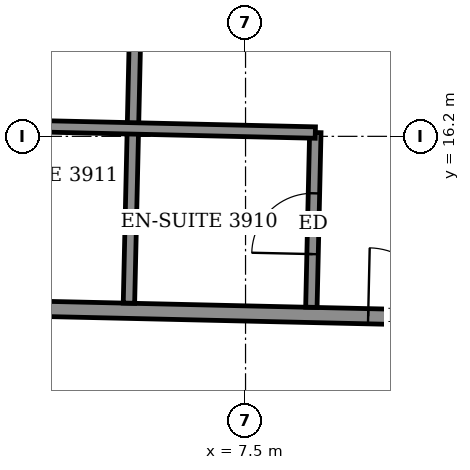
"""IFC4 building model, lengths in metres.
Left out: names, types, materials, properties, quantities, classifications, styles, units other than length and angle.
Written with IfcOpenShell. Run it as: python <this file> out.ifc"""

import sys

from ifc_helpers import new_model, si_unit, direction, frame, frame_2d, origin, place, context, subcontext, project, spatial, rectangle, extrude, element, fill, save


model = new_model("IFC4")
c1 = context("Model", 3, precision=1e-05, world=origin(), true_north=direction((0.0, 1.0)))
c2 = subcontext(c1, "Body", "Model", "MODEL_VIEW")
j1 = project(units=[si_unit("LENGTHUNIT", "METRE"), si_unit("PLANEANGLEUNIT", "RADIAN")], contexts=[c1])
p1 = place(None, origin())
s1 = spatial("IfcSite", under=j1, at=p1, CompositionType="ELEMENT")
p2 = place(p1, origin())
s2 = spatial("IfcBuilding", under=s1, at=p2, CompositionType="ELEMENT")
p3 = place(p2, frame((0.0, 0.0, 156.3)))
s3 = spatial("IfcBuildingStorey", under=s2, at=p3, CompositionType="ELEMENT", Elevation=156.3)
p4 = place(p3, frame((-21.279, 14.523, 0.0), z_axis=(0.0, 0.0, 1.0), x_axis=(0.999742669174, -0.02268469602, 0.0)))
e1 = element("IfcWall", 1, at=p4, inside=s3, PredefinedType="PARTITIONING", context=c2, shape_type="SweptSolid", body=[
    extrude(rectangle(XDim=40.639, YDim=0.2, at=frame_2d((20.319, 0.0))), origin(), (0.0, 0.0, 1.0), 3.05),
])
p5 = place(p4, frame((37.65, 0.0, 0.0)))
e2 = element("IfcOpeningElement", 2, at=p5, cuts=e1, PredefinedType="OPENING", context=c2, shape_type="SweptSolid", body=[
    extrude(rectangle(XDim=0.9, YDim=2.1, at=frame_2d((0.45, 1.05))), frame((0.0, 0.11, 0.0), z_axis=(0.0, -1.0, 0.0), x_axis=(1.0, 0.0, 0.0)), (0.0, 0.0, 1.0), 0.22),
])
p6 = place(p4, frame((32.775, 0.0, 0.0)))
e3 = element("IfcOpeningElement", 3, at=p6, cuts=e1, PredefinedType="OPENING", context=c2, shape_type="SweptSolid", body=[
    extrude(rectangle(XDim=0.9, YDim=2.1, at=frame_2d((0.45, 1.05))), frame((0.0, 0.11, 0.0), z_axis=(0.0, -1.0, 0.0), x_axis=(1.0, 0.0, 0.0)), (0.0, 0.0, 1.0), 0.22),
])
p7 = place(p4, frame((30.4, 0.0, 0.0)))
e4 = element("IfcOpeningElement", 4, at=p7, cuts=e1, PredefinedType="OPENING", context=c2, shape_type="SweptSolid", body=[
    extrude(rectangle(XDim=0.9, YDim=2.1, at=frame_2d((0.45, 1.05))), frame((0.0, 0.11, 0.0), z_axis=(0.0, -1.0, 0.0), x_axis=(1.0, 0.0, 0.0)), (0.0, 0.0, 1.0), 0.22),
])
p8 = place(p4, frame((23.225, 0.0, 0.0)))
e5 = element("IfcOpeningElement", 5, at=p8, cuts=e1, PredefinedType="OPENING", context=c2, shape_type="SweptSolid", body=[
    extrude(rectangle(XDim=0.9, YDim=2.1, at=frame_2d((0.45, 1.05))), frame((0.0, 0.11, 0.0), z_axis=(0.0, -1.0, 0.0), x_axis=(1.0, 0.0, 0.0)), (0.0, 0.0, 1.0), 0.22),
])
p9 = place(p4, frame((20.85, 0.0, 0.0)))
e6 = element("IfcOpeningElement", 6, at=p9, cuts=e1, PredefinedType="OPENING", context=c2, shape_type="SweptSolid", body=[
    extrude(rectangle(XDim=0.9, YDim=2.1, at=frame_2d((0.45, 1.05))), frame((0.0, 0.11, 0.0), z_axis=(0.0, -1.0, 0.0), x_axis=(1.0, 0.0, 0.0)), (0.0, 0.0, 1.0), 0.22),
])
p10 = place(p4, frame((13.675, 0.0, 0.0)))
e7 = element("IfcOpeningElement", 7, at=p10, cuts=e1, PredefinedType="OPENING", context=c2, shape_type="SweptSolid", body=[
    extrude(rectangle(XDim=0.9, YDim=2.1, at=frame_2d((0.45, 1.05))), frame((0.0, 0.11, 0.0), z_axis=(0.0, -1.0, 0.0), x_axis=(1.0, 0.0, 0.0)), (0.0, 0.0, 1.0), 0.22),
])
p11 = place(p4, frame((11.325, 0.0, 0.0)))
e8 = element("IfcOpeningElement", 8, at=p11, cuts=e1, PredefinedType="OPENING", context=c2, shape_type="SweptSolid", body=[
    extrude(rectangle(XDim=0.9, YDim=2.1, at=frame_2d((0.45, 1.05))), frame((0.0, 0.11, 0.0), z_axis=(0.0, -1.0, 0.0), x_axis=(1.0, 0.0, 0.0)), (0.0, 0.0, 1.0), 0.22),
])
p12 = place(p4, frame((1.6, 0.0, 0.0)))
e9 = element("IfcOpeningElement", 9, at=p12, cuts=e1, PredefinedType="OPENING", context=c2, shape_type="SweptSolid", body=[
    extrude(rectangle(XDim=1.0, YDim=2.1, at=frame_2d((0.5, 1.05))), frame((0.0, 0.11, 0.0), z_axis=(0.0, -1.0, 0.0), x_axis=(1.0, 0.0, 0.0)), (0.0, 0.0, 1.0), 0.22),
])
p13 = place(p4, frame((6.55, 0.0, 0.0)))
e10 = element("IfcOpeningElement", 10, at=p13, cuts=e1, PredefinedType="OPENING", context=c2, shape_type="SweptSolid", body=[
    extrude(rectangle(XDim=0.9, YDim=2.1, at=frame_2d((0.45, 1.05))), frame((0.0, 0.11, 0.0), z_axis=(0.0, -1.0, 0.0), x_axis=(1.0, 0.0, 0.0)), (0.0, 0.0, 1.0), 0.22),
])
p14 = place(p3, frame((5.966, 14.005, 0.0), z_axis=(0.0, 0.0, 1.0), x_axis=(0.022687855237, 0.999742597484, 0.0)))
e11 = element("IfcWall", 11, at=p14, inside=s3, PredefinedType="PARTITIONING", context=c2, shape_type="SweptSolid", body=[
    extrude(rectangle(XDim=5.951, YDim=0.15, at=frame_2d((2.975, 0.0))), origin(), (0.0, 0.0, 1.0), 2.55),
])
p15 = place(p3, frame((8.366, 13.951, 0.0), z_axis=(0.0, 0.0, 1.0), x_axis=(0.022612884682, 0.999744296031, 0.0)))
e12 = element("IfcWall", 12, at=p15, inside=s3, PredefinedType="PARTITIONING", context=c2, shape_type="SweptSolid", body=[
    extrude(rectangle(XDim=2.3, YDim=0.15, at=frame_2d((1.15, 0.0))), origin(), (0.0, 0.0, 1.0), 3.05),
])
p16 = place(p15, frame((0.7, 0.0, 0.0)))
e13 = element("IfcOpeningElement", 13, at=p16, cuts=e12, PredefinedType="OPENING", context=c2, shape_type="SweptSolid", body=[
    extrude(rectangle(XDim=0.8, YDim=2.1, at=frame_2d((0.4, 1.05))), frame((0.0, 0.085, 0.0), z_axis=(0.0, -1.0, 0.0), x_axis=(1.0, 0.0, 0.0)), (0.0, 0.0, 1.0), 0.17),
])
p17 = place(p3, frame((3.619, 16.359, 0.0), z_axis=(0.0, 0.0, 1.0), x_axis=(0.999742701292, -0.022683280499, 0.0)))
e14 = element("IfcWall", 14, at=p17, inside=s3, PredefinedType="PARTITIONING", context=c2, shape_type="SweptSolid", body=[
    extrude(rectangle(XDim=4.8, YDim=0.15, at=frame_2d((2.4, 0.0))), origin(), (0.0, 0.0, 1.0), 3.05),
])
p18 = place(p7, origin())
e15 = element("IfcDoor", 15, at=p18, inside=s3, OperationType="SINGLE_SWING_RIGHT", PredefinedType="DOOR", context=c2, shape_type="SweptSolid", body=[
    extrude(rectangle(XDim=0.9, YDim=2.1, at=frame_2d((0.45, 1.05))), frame((0.0, 0.025, 0.0), z_axis=(0.0, -1.0, 0.0), x_axis=(1.0, 0.0, 0.0)), (0.0, 0.0, 1.0), 0.05),
])
fill(e4, e15)
p19 = place(p16, origin())
e16 = element("IfcDoor", 16, at=p19, inside=s3, OperationType="SINGLE_SWING_RIGHT", PredefinedType="DOOR", context=c2, shape_type="SweptSolid", body=[
    extrude(rectangle(XDim=0.8, YDim=2.1, at=frame_2d((0.4, 1.05))), frame((0.0, 0.025, 0.0), z_axis=(0.0, -1.0, 0.0), x_axis=(1.0, 0.0, 0.0)), (0.0, 0.0, 1.0), 0.05),
])
fill(e13, e16)
save(model, sys.argv[1])
